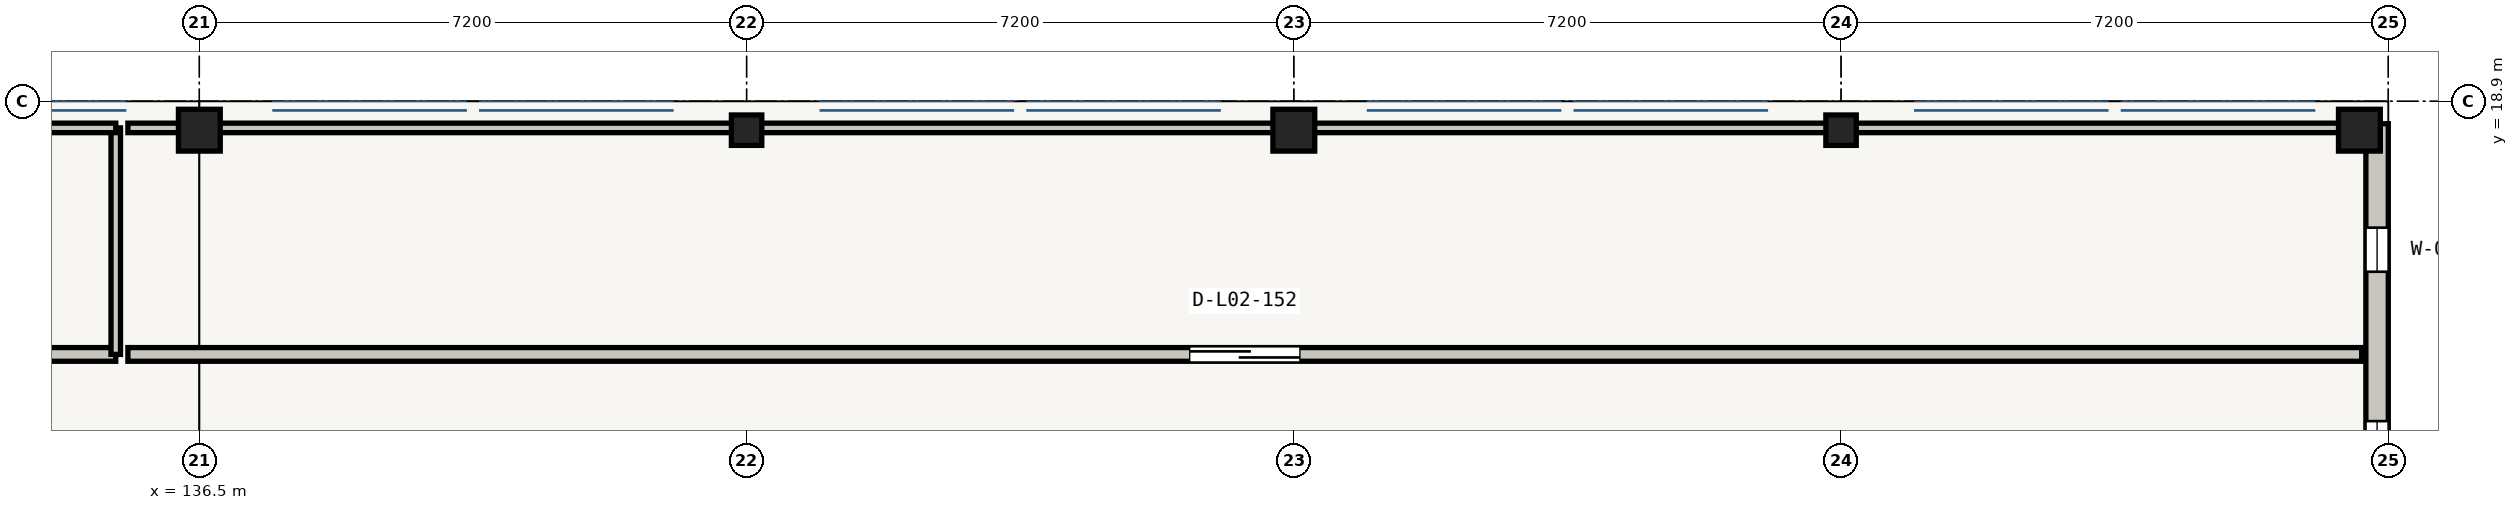
"""IFC4 building model, lengths in metres.
Left out: names, types, materials, properties, quantities, classifications, styles, units other than length and angle.
Written with IfcOpenShell. Run it as: python <this file> out.ifc"""

import sys

from ifc_helpers import new_model, si_unit, direction, frame, frame_2d, origin, origin_2d, place, context, subcontext, project, spatial, rectangle, extrude, element, fill, save


model = new_model("IFC4")
c1 = context("Model", 3, precision=1e-05, world=origin(), true_north=direction((0.0, 1.0)))
c2 = subcontext(c1, "Body", "Model", "MODEL_VIEW")
j1 = project(units=[si_unit("LENGTHUNIT", "METRE"), si_unit("PLANEANGLEUNIT", "RADIAN")], contexts=[c1])
p1 = place(None, origin())
s1 = spatial("IfcSite", under=j1, at=p1, CompositionType="ELEMENT")
p2 = place(p1, origin())
s2 = spatial("IfcBuilding", under=s1, at=p2, CompositionType="ELEMENT")
p3 = place(p2, frame((0.0, 0.0, 8.7)))
s3 = spatial("IfcBuildingStorey", under=s2, at=p3, CompositionType="ELEMENT", Elevation=8.7)
p4 = place(p3, frame((136.5, 18.52, 0.0), z_axis=(0.0, 0.0, 1.0), x_axis=(1.0, 0.0, 0.0)))
e1 = element("IfcColumn", 1, at=p4, inside=s3, PredefinedType="COLUMN", context=c2, shape_type="SweptSolid", body=[
    extrude(rectangle(XDim=0.55, YDim=0.55, at=origin_2d()), origin(), (0.0, 0.0, 1.0), 4.02),
])
p5 = place(p3, frame((143.7, 18.52, 0.0), z_axis=(0.0, 0.0, 1.0), x_axis=(1.0, 0.0, 0.0)))
e2 = element("IfcColumn", 2, at=p5, inside=s3, PredefinedType="COLUMN", context=c2, shape_type="SweptSolid", body=[
    extrude(rectangle(XDim=0.4, YDim=0.4, at=origin_2d()), origin(), (0.0, 0.0, 1.0), 4.02),
])
p6 = place(p3, frame((150.9, 18.52, 0.0), z_axis=(0.0, 0.0, 1.0), x_axis=(1.0, 0.0, 0.0)))
e3 = element("IfcColumn", 3, at=p6, inside=s3, PredefinedType="COLUMN", context=c2, shape_type="SweptSolid", body=[
    extrude(rectangle(XDim=0.55, YDim=0.55, at=origin_2d()), origin(), (0.0, 0.0, 1.0), 4.02),
])
p7 = place(p3, frame((158.1, 18.52, 0.0), z_axis=(0.0, 0.0, 1.0), x_axis=(1.0, 0.0, 0.0)))
e4 = element("IfcColumn", 4, at=p7, inside=s3, PredefinedType="COLUMN", context=c2, shape_type="SweptSolid", body=[
    extrude(rectangle(XDim=0.4, YDim=0.4, at=origin_2d()), origin(), (0.0, 0.0, 1.0), 4.02),
])
p8 = place(p3, frame((164.92, 18.52, 0.0), z_axis=(0.0, 0.0, 1.0), x_axis=(1.0, 0.0, 0.0)))
e5 = element("IfcColumn", 5, at=p8, inside=s3, PredefinedType="COLUMN", context=c2, shape_type="SweptSolid", body=[
    extrude(rectangle(XDim=0.55, YDim=0.55, at=origin_2d()), origin(), (0.0, 0.0, 1.0), 4.02),
])
p9 = place(p3, frame((165.153, 18.605, 0.0), z_axis=(0.0, 0.0, 1.0), x_axis=(0.0, -1.0, 0.0)))
e6 = element("IfcWall", 6, at=p9, inside=s3, PredefinedType="STANDARD", context=c2, shape_type="SweptSolid", body=[
    extrude(rectangle(XDim=6.905, YDim=0.295, at=frame_2d((3.453, 0.0))), origin(), (0.0, 0.0, 1.0), 3.632),
])
p10 = place(p9, frame((1.367, 0.0, 0.55)))
e7 = element("IfcOpeningElement", 7, at=p10, cuts=e6, PredefinedType="OPENING", context=c2, shape_type="SweptSolid", body=[
    extrude(rectangle(XDim=0.58, YDim=2.35, at=frame_2d((0.29, 1.175))), frame((0.0, 0.147, 0.0), z_axis=(0.0, -1.0, 0.0), x_axis=(1.0, 0.0, 0.0)), (0.0, 0.0, 1.0), 0.295),
])
p11 = place(p9, frame((3.913, 0.0, 0.55)))
e8 = element("IfcOpeningElement", 8, at=p11, cuts=e6, PredefinedType="OPENING", context=c2, shape_type="SweptSolid", body=[
    extrude(rectangle(XDim=0.58, YDim=2.35, at=frame_2d((0.29, 1.175))), frame((0.0, 0.147, 0.0), z_axis=(0.0, -1.0, 0.0), x_axis=(1.0, 0.0, 0.0)), (0.0, 0.0, 1.0), 0.295),
])
p12 = place(p3, frame((135.4, 15.57, 0.0), z_axis=(0.0, 0.0, 1.0), x_axis=(-1.0, 0.0, 0.0)))
e9 = element("IfcWall", 9, at=p12, inside=s3, PredefinedType="PARTITIONING", context=c2, shape_type="SweptSolid", body=[
    extrude(rectangle(XDim=29.39, YDim=0.18, at=frame_2d((14.695, 0.0))), origin(), (0.0, 0.0, 1.0), 2.925),
])
p13 = place(p12, frame((13.97, 0.0, 0.0)))
e10 = element("IfcOpeningElement", 10, at=p13, cuts=e9, PredefinedType="OPENING", context=c2, shape_type="SweptSolid", body=[
    extrude(rectangle(XDim=1.45, YDim=2.1, at=frame_2d((0.725, 1.05))), frame((0.0, 0.09, 0.0), z_axis=(0.0, -1.0, 0.0), x_axis=(1.0, 0.0, 0.0)), (0.0, 0.0, 1.0), 0.18),
])
p14 = place(p3, frame((135.4, 18.55, 0.0), z_axis=(0.0, 0.0, 1.0), x_axis=(0.0, -1.0, 0.0)))
e11 = element("IfcWall", 11, at=p14, inside=s3, PredefinedType="PARTITIONING", context=c2, shape_type="SweptSolid", body=[
    extrude(rectangle(XDim=2.98, YDim=0.125, at=frame_2d((1.49, 0.0))), origin(), (0.0, 0.0, 1.0), 2.925),
])
p15 = place(p3, frame((106.01, 18.55, 0.0), z_axis=(0.0, 0.0, 1.0), x_axis=(1.0, 0.0, 0.0)))
e12 = element("IfcWall", 12, at=p15, inside=s3, PredefinedType="PARTITIONING", context=c2, shape_type="SweptSolid", body=[
    extrude(rectangle(XDim=29.39, YDim=0.125, at=frame_2d((14.695, 0.0))), origin(), (0.0, 0.0, 1.0), 2.925),
])
p16 = place(p3, frame((164.95, 15.57, 0.0), z_axis=(0.0, 0.0, 1.0), x_axis=(-1.0, 0.0, 0.0)))
e13 = element("IfcWall", 13, at=p16, inside=s3, PredefinedType="PARTITIONING", context=c2, shape_type="SweptSolid", body=[
    extrude(rectangle(XDim=29.39, YDim=0.18, at=frame_2d((14.695, 0.0))), origin(), (0.0, 0.0, 1.0), 2.925),
])
p17 = place(p16, frame((13.97, 0.0, 0.0)))
e14 = element("IfcOpeningElement", 14, at=p17, cuts=e13, PredefinedType="OPENING", context=c2, shape_type="SweptSolid", body=[
    extrude(rectangle(XDim=1.45, YDim=2.1, at=frame_2d((0.725, 1.05))), frame((0.0, 0.09, 0.0), z_axis=(0.0, -1.0, 0.0), x_axis=(1.0, 0.0, 0.0)), (0.0, 0.0, 1.0), 0.18),
])
p18 = place(p3, frame((135.56, 18.55, 0.0), z_axis=(0.0, 0.0, 1.0), x_axis=(1.0, 0.0, 0.0)))
e15 = element("IfcWall", 15, at=p18, inside=s3, PredefinedType="PARTITIONING", context=c2, shape_type="SweptSolid", body=[
    extrude(rectangle(XDim=29.39, YDim=0.125, at=frame_2d((14.695, 0.0))), origin(), (0.0, 0.0, 1.0), 2.925),
])
p19 = place(p10, origin())
e16 = element("IfcWindow", 16, at=p19, inside=s3, PartitioningType="SINGLE_PANEL", PredefinedType="WINDOW", context=c2, shape_type="SweptSolid", body=[
    extrude(rectangle(XDim=0.58, YDim=2.35, at=frame_2d((0.29, 1.175))), frame((0.0, 0.03, 0.0), z_axis=(0.0, -1.0, 0.0), x_axis=(1.0, 0.0, 0.0)), (0.0, 0.0, 1.0), 0.06),
])
fill(e7, e16)
p20 = place(p11, origin())
e17 = element("IfcWindow", 17, at=p20, inside=s3, PartitioningType="SINGLE_PANEL", PredefinedType="WINDOW", context=c2, shape_type="SweptSolid", body=[
    extrude(rectangle(XDim=0.58, YDim=2.35, at=frame_2d((0.29, 1.175))), frame((0.0, 0.03, 0.0), z_axis=(0.0, -1.0, 0.0), x_axis=(1.0, 0.0, 0.0)), (0.0, 0.0, 1.0), 0.06),
])
fill(e8, e17)
p21 = place(p17, origin())
e18 = element("IfcDoor", 18, at=p21, inside=s3, OperationType="SLIDING_TO_LEFT", PredefinedType="DOOR", context=c2, shape_type="SweptSolid", body=[
    extrude(rectangle(XDim=1.45, YDim=2.1, at=frame_2d((0.725, 1.05))), frame((0.0, 0.025, 0.0), z_axis=(0.0, -1.0, 0.0), x_axis=(1.0, 0.0, 0.0)), (0.0, 0.0, 1.0), 0.05),
])
fill(e14, e18)
save(model, sys.argv[1])
